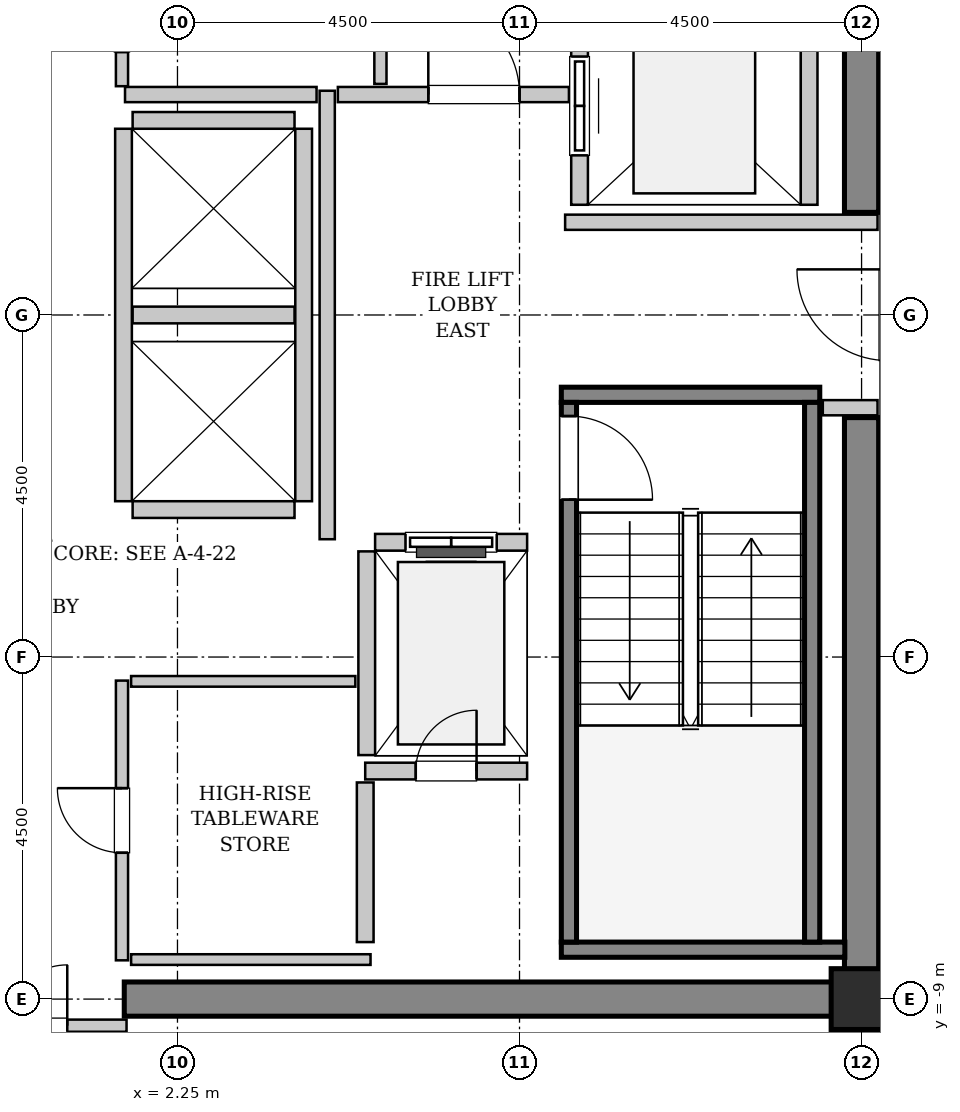
"""IFC4 building model, lengths in metres.
Left out: names, types, materials, properties, quantities, classifications, styles, units other than length and angle.
Written with IfcOpenShell. Run it as: python <this file> out.ifc"""

import sys

from ifc_helpers import new_model, si_unit, direction, frame, frame_2d, origin, origin_2d, place, context, subcontext, project, spatial, rectangle, hollow_rectangle, extrude, source, transform, mapped, element, fill, save


model = new_model("IFC4")
c1 = context("Model", 3, precision=1e-05, world=origin(), true_north=direction((0.0, 1.0)))
c2 = subcontext(c1, "Body", "Model", "MODEL_VIEW")
j1 = project(units=[si_unit("LENGTHUNIT", "METRE"), si_unit("PLANEANGLEUNIT", "RADIAN")], contexts=[c1])
p1 = place(None, origin())
s1 = spatial("IfcSite", under=j1, at=p1, CompositionType="ELEMENT")
p2 = place(p1, origin())
s2 = spatial("IfcBuilding", under=s1, at=p2, CompositionType="ELEMENT")
p3 = place(p2, frame((0.0, 0.0, 268.4)))
s3 = spatial("IfcBuildingStorey", under=s2, at=p3, CompositionType="ELEMENT", Elevation=268.4)
m1 = source(origin(), c2, "Body", "SweptSolid", [
    extrude(rectangle(XDim=9.925, YDim=0.45, at=frame_2d((4.962, 0.0))), origin(), (0.0, 0.0, 1.0), 3.8),
])
p4 = place(p3, frame((1.55, -9.0, 0.0), z_axis=(0.0, 0.0, 1.0), x_axis=(1.0, 0.0, 0.0)))
e1 = element("IfcWall", 1, at=p4, inside=s3, PredefinedType="SHEAR", context=c2, shape_type="MappedRepresentation", body=[
    mapped(m1, transform((0.0, 0.0, 0.0), x_axis=(1.0, 0.0, 0.0), y_axis=(0.0, 1.0, 0.0), z_axis=(0.0, 0.0, 1.0), scale=1.0)),
])
m2 = source(origin(), c2, "Body", "SweptSolid", [
    extrude(rectangle(XDim=7.425, YDim=0.45, at=frame_2d((3.712, 0.0))), origin(), (0.0, 0.0, 1.0), 3.8),
])
for number, where, z_axis, x_axis in (
    (2, (11.25, -8.775, 0.0), (0.0, 0.0, 1.0), (0.0, 1.0, 0.0)),
    (3, (11.25, 1.35, 0.0), (0.0, 0.0, 1.0), (0.0, 1.0, 0.0)),
):
    element("IfcWall", number, at=place(p3, frame(where, z_axis=z_axis, x_axis=x_axis)), inside=s3, PredefinedType="SHEAR", context=c2, shape_type="MappedRepresentation", body=[
        mapped(m2, transform((0.0, 0.0, 0.0), x_axis=(1.0, 0.0, 0.0), y_axis=(0.0, 1.0, 0.0), z_axis=(0.0, 0.0, 1.0), scale=1.0)),
    ])
m3 = source(origin(), c2, "Body", "SweptSolid", [
    extrude(hollow_rectangle(XDim=0.8, YDim=0.8, WallThickness=0.04, InnerFilletRadius=0.04, OuterFilletRadius=0.08, at=origin_2d()), origin(), (0.0, 0.0, 1.0), 3.8),
])
p5 = place(p3, frame((11.25, -9.0, 0.0), z_axis=(0.0, 0.0, 1.0), x_axis=(1.0, 0.0, 0.0)))
e4 = element("IfcColumn", 4, at=p5, inside=s3, PredefinedType="COLUMN", context=c2, shape_type="MappedRepresentation", body=[
    mapped(m3, transform((0.0, 0.0, 0.0), x_axis=(1.0, 0.0, 0.0), y_axis=(0.0, 1.0, 0.0), z_axis=(0.0, 0.0, 1.0), scale=1.0)),
])
m4 = source(origin(), c2, "Body", "SweptSolid", [
    extrude(rectangle(XDim=3.4, YDim=0.2, at=frame_2d((1.7, 0.0))), origin(), (0.0, 0.0, 1.0), 3.8),
])
p6 = place(p3, frame((7.3, -1.05, 0.0), z_axis=(0.0, 0.0, 1.0), x_axis=(1.0, 0.0, 0.0)))
e5 = element("IfcWall", 5, at=p6, inside=s3, PredefinedType="SOLIDWALL", context=c2, shape_type="MappedRepresentation", body=[
    mapped(m4, transform((0.0, 0.0, 0.0), x_axis=(1.0, 0.0, 0.0), y_axis=(0.0, 1.0, 0.0), z_axis=(0.0, 0.0, 1.0), scale=1.0)),
])
m5 = source(origin(), c2, "Body", "SweptSolid", [
    extrude(rectangle(XDim=3.73, YDim=0.2, at=frame_2d((1.865, 0.0))), origin(), (0.0, 0.0, 1.0), 3.8),
])
p7 = place(p3, frame((7.3, -8.35, 0.0), z_axis=(0.0, 0.0, 1.0), x_axis=(1.0, 0.0, 0.0)))
e6 = element("IfcWall", 6, at=p7, inside=s3, PredefinedType="SOLIDWALL", context=c2, shape_type="MappedRepresentation", body=[
    mapped(m5, transform((0.0, 0.0, 0.0), x_axis=(1.0, 0.0, 0.0), y_axis=(0.0, 1.0, 0.0), z_axis=(0.0, 0.0, 1.0), scale=1.0)),
])
m6 = source(origin(), c2, "Body", "SweptSolid", [
    extrude(rectangle(XDim=7.1, YDim=0.2, at=frame_2d((3.55, 0.0))), origin(), (0.0, 0.0, 1.0), 3.8),
])
p8 = place(p3, frame((7.4, -1.15, 0.0), z_axis=(0.0, 0.0, 1.0), x_axis=(0.0, -1.0, 0.0)))
e7 = element("IfcWall", 7, at=p8, inside=s3, PredefinedType="SOLIDWALL", context=c2, shape_type="MappedRepresentation", body=[
    mapped(m6, transform((0.0, 0.0, 0.0), x_axis=(1.0, 0.0, 0.0), y_axis=(0.0, 1.0, 0.0), z_axis=(0.0, 0.0, 1.0), scale=1.0)),
])
p9 = place(p8, frame((0.18, 0.0, 0.0)))
e8 = element("IfcOpeningElement", 8, at=p9, cuts=e7, PredefinedType="OPENING", context=c2, shape_type="SweptSolid", body=[
    extrude(rectangle(XDim=1.1, YDim=2.15, at=frame_2d((0.55, 1.075))), frame((0.0, 0.11, 0.0), z_axis=(0.0, -1.0, 0.0), x_axis=(1.0, 0.0, 0.0)), (0.0, 0.0, 1.0), 0.22),
])
p10 = place(p3, frame((10.6, -1.15, 0.0), z_axis=(0.0, 0.0, 1.0), x_axis=(0.0, -1.0, 0.0)))
e9 = element("IfcWall", 9, at=p10, inside=s3, PredefinedType="SOLIDWALL", context=c2, shape_type="MappedRepresentation", body=[
    mapped(m6, transform((0.0, 0.0, 0.0), x_axis=(1.0, 0.0, 0.0), y_axis=(0.0, 1.0, 0.0), z_axis=(0.0, 0.0, 1.0), scale=1.0)),
])
m7 = source(origin(), c2, "Body", "SweptSolid", [
    extrude(rectangle(XDim=2.0, YDim=0.22, at=frame_2d((1.0, 0.0))), origin(), (0.0, 0.0, 1.0), 3.535),
])
p11 = place(p3, frame((6.85, -2.99, 0.0), z_axis=(0.0, 0.0, 1.0), x_axis=(-1.0, 0.0, 0.0)))
e10 = element("IfcWall", 10, at=p11, inside=s3, PredefinedType="SOLIDWALL", context=c2, shape_type="MappedRepresentation", body=[
    mapped(m7, transform((0.0, 0.0, 0.0), x_axis=(1.0, 0.0, 0.0), y_axis=(0.0, 1.0, 0.0), z_axis=(0.0, 0.0, 1.0), scale=1.0)),
])
p12 = place(p11, frame((0.4, 0.0, 0.0)))
e11 = element("IfcOpeningElement", 11, at=p12, cuts=e10, PredefinedType="OPENING", context=c2, shape_type="SweptSolid", body=[
    extrude(rectangle(XDim=1.2, YDim=2.2, at=frame_2d((0.6, 1.1))), frame((0.0, 0.12, 0.0), z_axis=(0.0, -1.0, 0.0), x_axis=(1.0, 0.0, 0.0)), (0.0, 0.0, 1.0), 0.24),
])
m8 = source(origin(), c2, "Body", "SweptSolid", [
    extrude(rectangle(XDim=2.68, YDim=0.22, at=frame_2d((1.34, 0.0))), origin(), (0.0, 0.0, 1.0), 3.535),
])
p13 = place(p3, frame((4.74, -3.11, 0.0), z_axis=(0.0, 0.0, 1.0), x_axis=(0.0, -1.0, 0.0)))
e12 = element("IfcWall", 12, at=p13, inside=s3, PredefinedType="SOLIDWALL", context=c2, shape_type="MappedRepresentation", body=[
    mapped(m8, transform((0.0, 0.0, 0.0), x_axis=(1.0, 0.0, 0.0), y_axis=(0.0, 1.0, 0.0), z_axis=(0.0, 0.0, 1.0), scale=1.0)),
])
m9 = source(origin(), c2, "Body", "SweptSolid", [
    extrude(rectangle(XDim=5.45, YDim=0.22, at=frame_2d((2.725, 0.0))), origin(), (0.0, 0.0, 1.0), 3.535),
])
p14 = place(p3, frame((7.54, 6.9, 0.0), z_axis=(0.0, 0.0, 1.0), x_axis=(0.0, -1.0, 0.0)))
e13 = element("IfcWall", 13, at=p14, inside=s3, PredefinedType="SOLIDWALL", context=c2, shape_type="MappedRepresentation", body=[
    mapped(m9, transform((0.0, 0.0, 0.0), x_axis=(1.0, 0.0, 0.0), y_axis=(0.0, 1.0, 0.0), z_axis=(0.0, 0.0, 1.0), scale=1.0)),
])
p15 = place(p14, frame((3.5, 0.0, 0.0)))
e14 = element("IfcOpeningElement", 14, at=p15, cuts=e13, PredefinedType="OPENING", context=c2, shape_type="SweptSolid", body=[
    extrude(rectangle(XDim=1.3, YDim=2.3, at=frame_2d((0.65, 1.15))), frame((0.0, 0.12, 0.0), z_axis=(0.0, -1.0, 0.0), x_axis=(1.0, 0.0, 0.0)), (0.0, 0.0, 1.0), 0.24),
])
p16 = place(p14, frame((0.65, 0.0, 0.0)))
e15 = element("IfcOpeningElement", 15, at=p16, cuts=e13, PredefinedType="OPENING", context=c2, shape_type="SweptSolid", body=[
    extrude(rectangle(XDim=1.3, YDim=2.3, at=frame_2d((0.65, 1.15))), frame((0.0, 0.12, 0.0), z_axis=(0.0, -1.0, 0.0), x_axis=(1.0, 0.0, 0.0)), (0.0, 0.0, 1.0), 0.24),
])
p17 = place(p3, frame((10.56, 1.45, 0.0), z_axis=(0.0, 0.0, 1.0), x_axis=(0.0, 1.0, 0.0)))
e16 = element("IfcWall", 16, at=p17, inside=s3, PredefinedType="SOLIDWALL", context=c2, shape_type="MappedRepresentation", body=[
    mapped(m9, transform((0.0, 0.0, 0.0), x_axis=(1.0, 0.0, 0.0), y_axis=(0.0, 1.0, 0.0), z_axis=(0.0, 0.0, 1.0), scale=1.0)),
])
m10 = source(origin(), c2, "Body", "SweptSolid", [
    extrude(rectangle(XDim=4.9, YDim=0.22, at=frame_2d((2.45, 0.0))), origin(), (0.0, 0.0, 1.0), 3.535),
])
for number, where, z_axis, x_axis in (
    (17, (1.54, 2.45, 0.0), (0.0, 0.0, 1.0), (0.0, -1.0, 0.0)),
    (18, (3.91, -2.45, 0.0), (0.0, 0.0, 1.0), (0.0, 1.0, 0.0)),
):
    element("IfcWall", number, at=place(p3, frame(where, z_axis=z_axis, x_axis=x_axis)), inside=s3, PredefinedType="SOLIDWALL", context=c2, shape_type="MappedRepresentation", body=[
        mapped(m10, transform((0.0, 0.0, 0.0), x_axis=(1.0, 0.0, 0.0), y_axis=(0.0, 1.0, 0.0), z_axis=(0.0, 0.0, 1.0), scale=1.0)),
    ])
m11 = source(origin(), c2, "Body", "SweptSolid", [
    extrude(rectangle(XDim=2.13, YDim=0.22, at=frame_2d((1.065, 0.0))), origin(), (0.0, 0.0, 1.0), 3.535),
])
for number, where, z_axis, x_axis in (
    (19, (1.66, -2.56, 0.0), (0.0, 0.0, 1.0), (1.0, 0.0, 0.0)),
    (20, (1.66, 0.0, 0.0), (0.0, 0.0, 1.0), (1.0, 0.0, 0.0)),
    (21, (3.79, 2.56, 0.0), (0.0, 0.0, 1.0), (-1.0, 0.0, 0.0)),
):
    element("IfcWall", number, at=place(p3, frame(where, z_axis=z_axis, x_axis=x_axis)), inside=s3, PredefinedType="SOLIDWALL", context=c2, shape_type="MappedRepresentation", body=[
        mapped(m11, transform((0.0, 0.0, 0.0), x_axis=(1.0, 0.0, 0.0), y_axis=(0.0, 1.0, 0.0), z_axis=(0.0, 0.0, 1.0), scale=1.0)),
    ])
p18 = place(p3, frame((4.72, -6.0, 0.0), z_axis=(0.0, 0.0, 1.0), x_axis=(1.0, 0.0, 0.0)))
e22 = element("IfcWall", 22, at=p18, inside=s3, PredefinedType="SOLIDWALL", context=c2, shape_type="MappedRepresentation", body=[
    mapped(m11, transform((0.0, 0.0, 0.0), x_axis=(1.0, 0.0, 0.0), y_axis=(0.0, 1.0, 0.0), z_axis=(0.0, 0.0, 1.0), scale=1.0)),
])
p19 = place(p18, frame((0.665, 0.0, 0.0)))
e23 = element("IfcOpeningElement", 23, at=p19, cuts=e22, PredefinedType="OPENING", context=c2, shape_type="SweptSolid", body=[
    extrude(rectangle(XDim=0.8, YDim=2.0, at=frame_2d((0.4, 1.0))), frame((0.0, 0.12, 0.0), z_axis=(0.0, -1.0, 0.0), x_axis=(1.0, 0.0, 0.0)), (0.0, 0.0, 1.0), 0.24),
])
m12 = source(origin(), c2, "Body", "SweptSolid", [
    extrude(rectangle(XDim=2.1, YDim=0.22, at=frame_2d((1.05, 0.0))), origin(), (0.0, 0.0, 1.0), 3.535),
])
p20 = place(p3, frame((4.72, -8.25, 0.0), z_axis=(0.0, 0.0, 1.0), x_axis=(0.0, 1.0, 0.0)))
e24 = element("IfcWall", 24, at=p20, inside=s3, PredefinedType="SOLIDWALL", context=c2, shape_type="MappedRepresentation", body=[
    mapped(m12, transform((0.0, 0.0, 0.0), x_axis=(1.0, 0.0, 0.0), y_axis=(0.0, 1.0, 0.0), z_axis=(0.0, 0.0, 1.0), scale=1.0)),
])
m13 = source(origin(), c2, "Body", "SweptSolid", [
    extrude(rectangle(XDim=5.9, YDim=0.2, at=frame_2d((2.95, 0.0))), origin(), (0.0, 0.0, 1.0), 3.535),
])
p21 = place(p3, frame((4.22, -2.95, 0.0), z_axis=(0.0, 0.0, 1.0), x_axis=(0.0, 1.0, 0.0)))
e25 = element("IfcWall", 25, at=p21, inside=s3, PredefinedType="PARTITIONING", context=c2, shape_type="MappedRepresentation", body=[
    mapped(m13, transform((0.0, 0.0, 0.0), x_axis=(1.0, 0.0, 0.0), y_axis=(0.0, 1.0, 0.0), z_axis=(0.0, 0.0, 1.0), scale=1.0)),
])
m14 = source(origin(), c2, "Body", "SweptSolid", [
    extrude(rectangle(XDim=2.52, YDim=0.2, at=frame_2d((1.26, 0.0))), origin(), (0.0, 0.0, 1.0), 3.535),
])
p22 = place(p3, frame((1.56, 2.9, 0.0), z_axis=(0.0, 0.0, 1.0), x_axis=(1.0, 0.0, 0.0)))
e26 = element("IfcWall", 26, at=p22, inside=s3, PredefinedType="PARTITIONING", context=c2, shape_type="MappedRepresentation", body=[
    mapped(m14, transform((0.0, 0.0, 0.0), x_axis=(1.0, 0.0, 0.0), y_axis=(0.0, 1.0, 0.0), z_axis=(0.0, 0.0, 1.0), scale=1.0)),
])
m15 = source(origin(), c2, "Body", "SweptSolid", [
    extrude(rectangle(XDim=3.04, YDim=0.2, at=frame_2d((1.52, 0.0))), origin(), (0.0, 0.0, 1.0), 3.535),
])
p23 = place(p3, frame((4.36, 2.9, 0.0), z_axis=(0.0, 0.0, 1.0), x_axis=(1.0, 0.0, 0.0)))
e27 = element("IfcWall", 27, at=p23, inside=s3, PredefinedType="PARTITIONING", context=c2, shape_type="MappedRepresentation", body=[
    mapped(m15, transform((0.0, 0.0, 0.0), x_axis=(1.0, 0.0, 0.0), y_axis=(0.0, 1.0, 0.0), z_axis=(0.0, 0.0, 1.0), scale=1.0)),
])
p24 = place(p23, frame((1.19, 0.0, 0.0)))
e28 = element("IfcOpeningElement", 28, at=p24, cuts=e27, PredefinedType="OPENING", context=c2, shape_type="SweptSolid", body=[
    extrude(rectangle(XDim=1.2, YDim=2.15, at=frame_2d((0.6, 1.075))), frame((0.0, 0.11, 0.0), z_axis=(0.0, -1.0, 0.0), x_axis=(1.0, 0.0, 0.0)), (0.0, 0.0, 1.0), 0.22),
])
m16 = source(origin(), c2, "Body", "SweptSolid", [
    extrude(rectangle(XDim=4.11, YDim=0.2, at=frame_2d((2.055, 0.0))), origin(), (0.0, 0.0, 1.0), 3.535),
])
p25 = place(p3, frame((7.35, 1.22, 0.0), z_axis=(0.0, 0.0, 1.0), x_axis=(1.0, 0.0, 0.0)))
e29 = element("IfcWall", 29, at=p25, inside=s3, PredefinedType="PARTITIONING", context=c2, shape_type="MappedRepresentation", body=[
    mapped(m16, transform((0.0, 0.0, 0.0), x_axis=(1.0, 0.0, 0.0), y_axis=(0.0, 1.0, 0.0), z_axis=(0.0, 0.0, 1.0), scale=1.0)),
])
m17 = source(origin(), c2, "Body", "SweptSolid", [
    extrude(rectangle(XDim=0.72, YDim=0.2, at=frame_2d((0.36, 0.0))), origin(), (0.0, 0.0, 1.0), 3.535),
])
p26 = place(p3, frame((10.74, -1.22, 0.0), z_axis=(0.0, 0.0, 1.0), x_axis=(1.0, 0.0, 0.0)))
e30 = element("IfcWall", 30, at=p26, inside=s3, PredefinedType="PARTITIONING", context=c2, shape_type="MappedRepresentation", body=[
    mapped(m17, transform((0.0, 0.0, 0.0), x_axis=(1.0, 0.0, 0.0), y_axis=(0.0, 1.0, 0.0), z_axis=(0.0, 0.0, 1.0), scale=1.0)),
])
m18 = source(origin(), c2, "Body", "SweptSolid", [
    extrude(rectangle(XDim=3.16, YDim=0.16, at=frame_2d((1.58, 0.0))), origin(), (0.0, 0.0, 1.0), 2.625),
])
p27 = place(p3, frame((-1.58, -9.35, 0.0), z_axis=(0.0, 0.0, 1.0), x_axis=(1.0, 0.0, 0.0)))
e31 = element("IfcWall", 31, at=p27, inside=s3, PredefinedType="PARTITIONING", context=c2, shape_type="MappedRepresentation", body=[
    mapped(m18, transform((0.0, 0.0, 0.0), x_axis=(1.0, 0.0, 0.0), y_axis=(0.0, 1.0, 0.0), z_axis=(0.0, 0.0, 1.0), scale=1.0)),
])
p28 = place(p27, frame((0.78, 0.0, 0.0)))
e32 = element("IfcOpeningElement", 32, at=p28, cuts=e31, PredefinedType="OPENING", context=c2, shape_type="SweptSolid", body=[
    extrude(rectangle(XDim=1.6, YDim=2.3, at=frame_2d((0.8, 1.15))), frame((0.0, 0.09, 0.0), z_axis=(0.0, -1.0, 0.0), x_axis=(1.0, 0.0, 0.0)), (0.0, 0.0, 1.0), 0.18),
])
m19 = source(origin(), c2, "Body", "SweptSolid", [
    extrude(rectangle(XDim=5.45, YDim=0.16, at=frame_2d((2.725, 0.0))), origin(), (0.0, 0.0, 1.0), 3.535),
])
p29 = place(p3, frame((4.92, 3.04, 0.0), z_axis=(0.0, 0.0, 1.0), x_axis=(0.0, 1.0, 0.0)))
e33 = element("IfcWall", 33, at=p29, inside=s3, PredefinedType="PARTITIONING", context=c2, shape_type="MappedRepresentation", body=[
    mapped(m19, transform((0.0, 0.0, 0.0), x_axis=(1.0, 0.0, 0.0), y_axis=(0.0, 1.0, 0.0), z_axis=(0.0, 0.0, 1.0), scale=1.0)),
])
m20 = source(origin(), c2, "Body", "SweptSolid", [
    extrude(rectangle(XDim=1.75, YDim=0.16, at=frame_2d((0.875, 0.0))), origin(), (0.0, 0.0, 1.0), 3.535),
])
p30 = place(p3, frame((1.52, 3.01, 0.0), z_axis=(0.0, 0.0, 1.0), x_axis=(0.0, 1.0, 0.0)))
e34 = element("IfcWall", 34, at=p30, inside=s3, PredefinedType="PARTITIONING", context=c2, shape_type="MappedRepresentation", body=[
    mapped(m20, transform((0.0, 0.0, 0.0), x_axis=(1.0, 0.0, 0.0), y_axis=(0.0, 1.0, 0.0), z_axis=(0.0, 0.0, 1.0), scale=1.0)),
])
p31 = place(p30, frame((0.45, 0.0, 0.0)))
e35 = element("IfcOpeningElement", 35, at=p31, cuts=e34, PredefinedType="OPENING", context=c2, shape_type="SweptSolid", body=[
    extrude(rectangle(XDim=0.85, YDim=2.1, at=frame_2d((0.425, 1.05))), frame((0.0, 0.09, 0.0), z_axis=(0.0, -1.0, 0.0), x_axis=(1.0, 0.0, 0.0)), (0.0, 0.0, 1.0), 0.18),
])
m21 = source(origin(), c2, "Body", "SweptSolid", [
    extrude(rectangle(XDim=3.68, YDim=0.16, at=frame_2d((1.84, 0.0))), origin(), (0.0, 0.0, 1.0), 3.535),
])
p32 = place(p3, frame((1.52, -8.49, 0.0), z_axis=(0.0, 0.0, 1.0), x_axis=(0.0, 1.0, 0.0)))
e36 = element("IfcWall", 36, at=p32, inside=s3, PredefinedType="PARTITIONING", context=c2, shape_type="MappedRepresentation", body=[
    mapped(m21, transform((0.0, 0.0, 0.0), x_axis=(1.0, 0.0, 0.0), y_axis=(0.0, 1.0, 0.0), z_axis=(0.0, 0.0, 1.0), scale=1.0)),
])
p33 = place(p32, frame((1.415, 0.0, 0.0)))
e37 = element("IfcOpeningElement", 37, at=p33, cuts=e36, PredefinedType="OPENING", context=c2, shape_type="SweptSolid", body=[
    extrude(rectangle(XDim=0.85, YDim=2.1, at=frame_2d((0.425, 1.05))), frame((0.0, 0.09, 0.0), z_axis=(0.0, -1.0, 0.0), x_axis=(1.0, 0.0, 0.0)), (0.0, 0.0, 1.0), 0.18),
])
m22 = source(origin(), c2, "Body", "SweptSolid", [
    extrude(rectangle(XDim=2.95, YDim=0.14, at=frame_2d((1.475, 0.0))), origin(), (0.0, 0.0, 1.0), 3.535),
])
p34 = place(p3, frame((1.64, -4.82, 0.0), z_axis=(0.0, 0.0, 1.0), x_axis=(1.0, 0.0, 0.0)))
e38 = element("IfcWall", 38, at=p34, inside=s3, PredefinedType="PARTITIONING", context=c2, shape_type="MappedRepresentation", body=[
    mapped(m22, transform((0.0, 0.0, 0.0), x_axis=(1.0, 0.0, 0.0), y_axis=(0.0, 1.0, 0.0), z_axis=(0.0, 0.0, 1.0), scale=1.0)),
])
m23 = source(origin(), c2, "Body", "SweptSolid", [
    extrude(rectangle(XDim=3.15, YDim=0.14, at=frame_2d((1.575, 0.0))), origin(), (0.0, 0.0, 1.0), 3.535),
])
p35 = place(p3, frame((1.64, -8.48, 0.0), z_axis=(0.0, 0.0, 1.0), x_axis=(1.0, 0.0, 0.0)))
e39 = element("IfcWall", 39, at=p35, inside=s3, PredefinedType="PARTITIONING", context=c2, shape_type="MappedRepresentation", body=[
    mapped(m23, transform((0.0, 0.0, 0.0), x_axis=(1.0, 0.0, 0.0), y_axis=(0.0, 1.0, 0.0), z_axis=(0.0, 0.0, 1.0), scale=1.0)),
])
m24 = source(origin(), c2, "Body", "SweptSolid", [
    extrude(rectangle(XDim=1.1, YDim=2.15, at=frame_2d((0.55, 1.075))), frame((0.0, 0.025, 0.0), z_axis=(0.0, -1.0, 0.0), x_axis=(1.0, 0.0, 0.0)), (0.0, 0.0, 1.0), 0.05),
])
p36 = place(p9, origin())
e40 = element("IfcDoor", 40, at=p36, inside=s3, OperationType="SINGLE_SWING_RIGHT", PredefinedType="DOOR", context=c2, shape_type="MappedRepresentation", body=[
    mapped(m24, transform((0.0, 0.0, 0.0), x_axis=(1.0, 0.0, 0.0), y_axis=(0.0, 1.0, 0.0), z_axis=(0.0, 0.0, 1.0), scale=1.0)),
])
fill(e8, e40)
m25 = source(origin(), c2, "Body", "SweptSolid", [
    extrude(rectangle(XDim=1.2, YDim=2.2, at=frame_2d((0.6, 1.1))), frame((0.0, 0.025, 0.0), z_axis=(0.0, -1.0, 0.0), x_axis=(1.0, 0.0, 0.0)), (0.0, 0.0, 1.0), 0.05),
])
p37 = place(p12, origin())
e41 = element("IfcDoor", 41, at=p37, inside=s3, OperationType="SLIDING_TO_LEFT", PredefinedType="DOOR", context=c2, shape_type="MappedRepresentation", body=[
    mapped(m25, transform((0.0, 0.0, 0.0), x_axis=(1.0, 0.0, 0.0), y_axis=(0.0, 1.0, 0.0), z_axis=(0.0, 0.0, 1.0), scale=1.0)),
])
fill(e11, e41)
m26 = source(origin(), c2, "Body", "SweptSolid", [
    extrude(rectangle(XDim=1.3, YDim=2.3, at=frame_2d((0.65, 1.15))), frame((0.0, 0.025, 0.0), z_axis=(0.0, -1.0, 0.0), x_axis=(1.0, 0.0, 0.0)), (0.0, 0.0, 1.0), 0.05),
])
p38 = place(p15, origin())
e42 = element("IfcDoor", 42, at=p38, inside=s3, OperationType="SLIDING_TO_RIGHT", PredefinedType="DOOR", context=c2, shape_type="MappedRepresentation", body=[
    mapped(m26, transform((0.0, 0.0, 0.0), x_axis=(1.0, 0.0, 0.0), y_axis=(0.0, 1.0, 0.0), z_axis=(0.0, 0.0, 1.0), scale=1.0)),
])
fill(e14, e42)
m27 = source(origin(), c2, "Body", "SweptSolid", [
    extrude(rectangle(XDim=0.8, YDim=2.0, at=frame_2d((0.4, 1.0))), frame((0.0, 0.025, 0.0), z_axis=(0.0, -1.0, 0.0), x_axis=(1.0, 0.0, 0.0)), (0.0, 0.0, 1.0), 0.05),
])
p39 = place(p19, origin())
e43 = element("IfcDoor", 43, at=p39, inside=s3, OperationType="SINGLE_SWING_RIGHT", PredefinedType="TRAPDOOR", context=c2, shape_type="MappedRepresentation", body=[
    mapped(m27, transform((0.0, 0.0, 0.0), x_axis=(1.0, 0.0, 0.0), y_axis=(0.0, 1.0, 0.0), z_axis=(0.0, 0.0, 1.0), scale=1.0)),
])
fill(e23, e43)
m28 = source(origin(), c2, "Body", "SweptSolid", [
    extrude(rectangle(XDim=1.2, YDim=2.15, at=frame_2d((0.6, 1.075))), frame((0.0, 0.025, 0.0), z_axis=(0.0, -1.0, 0.0), x_axis=(1.0, 0.0, 0.0)), (0.0, 0.0, 1.0), 0.05),
])
p40 = place(p24, origin())
e44 = element("IfcDoor", 44, at=p40, inside=s3, OperationType="SINGLE_SWING_LEFT", PredefinedType="DOOR", context=c2, shape_type="MappedRepresentation", body=[
    mapped(m28, transform((0.0, 0.0, 0.0), x_axis=(1.0, 0.0, 0.0), y_axis=(0.0, 1.0, 0.0), z_axis=(0.0, 0.0, 1.0), scale=1.0)),
])
fill(e28, e44)
m29 = source(origin(), c2, "Body", "SweptSolid", [
    extrude(rectangle(XDim=1.6, YDim=2.3, at=frame_2d((0.8, 1.15))), frame((0.0, 0.025, 0.0), z_axis=(0.0, -1.0, 0.0), x_axis=(1.0, 0.0, 0.0)), (0.0, 0.0, 1.0), 0.05),
])
p41 = place(p28, origin())
e45 = element("IfcDoor", 45, at=p41, inside=s3, OperationType="DOUBLE_DOOR_SINGLE_SWING", PredefinedType="DOOR", context=c2, shape_type="MappedRepresentation", body=[
    mapped(m29, transform((0.0, 0.0, 0.0), x_axis=(1.0, 0.0, 0.0), y_axis=(0.0, 1.0, 0.0), z_axis=(0.0, 0.0, 1.0), scale=1.0)),
])
fill(e32, e45)
m30 = source(origin(), c2, "Body", "SweptSolid", [
    extrude(rectangle(XDim=0.85, YDim=2.1, at=frame_2d((0.425, 1.05))), frame((0.0, 0.025, 0.0), z_axis=(0.0, -1.0, 0.0), x_axis=(1.0, 0.0, 0.0)), (0.0, 0.0, 1.0), 0.05),
])
p42 = place(p33, origin())
e46 = element("IfcDoor", 46, at=p42, inside=s3, OperationType="SINGLE_SWING_RIGHT", PredefinedType="DOOR", context=c2, shape_type="MappedRepresentation", body=[
    mapped(m30, transform((0.0, 0.0, 0.0), x_axis=(1.0, 0.0, 0.0), y_axis=(0.0, 1.0, 0.0), z_axis=(0.0, 0.0, 1.0), scale=1.0)),
])
fill(e37, e46)
save(model, sys.argv[1])
